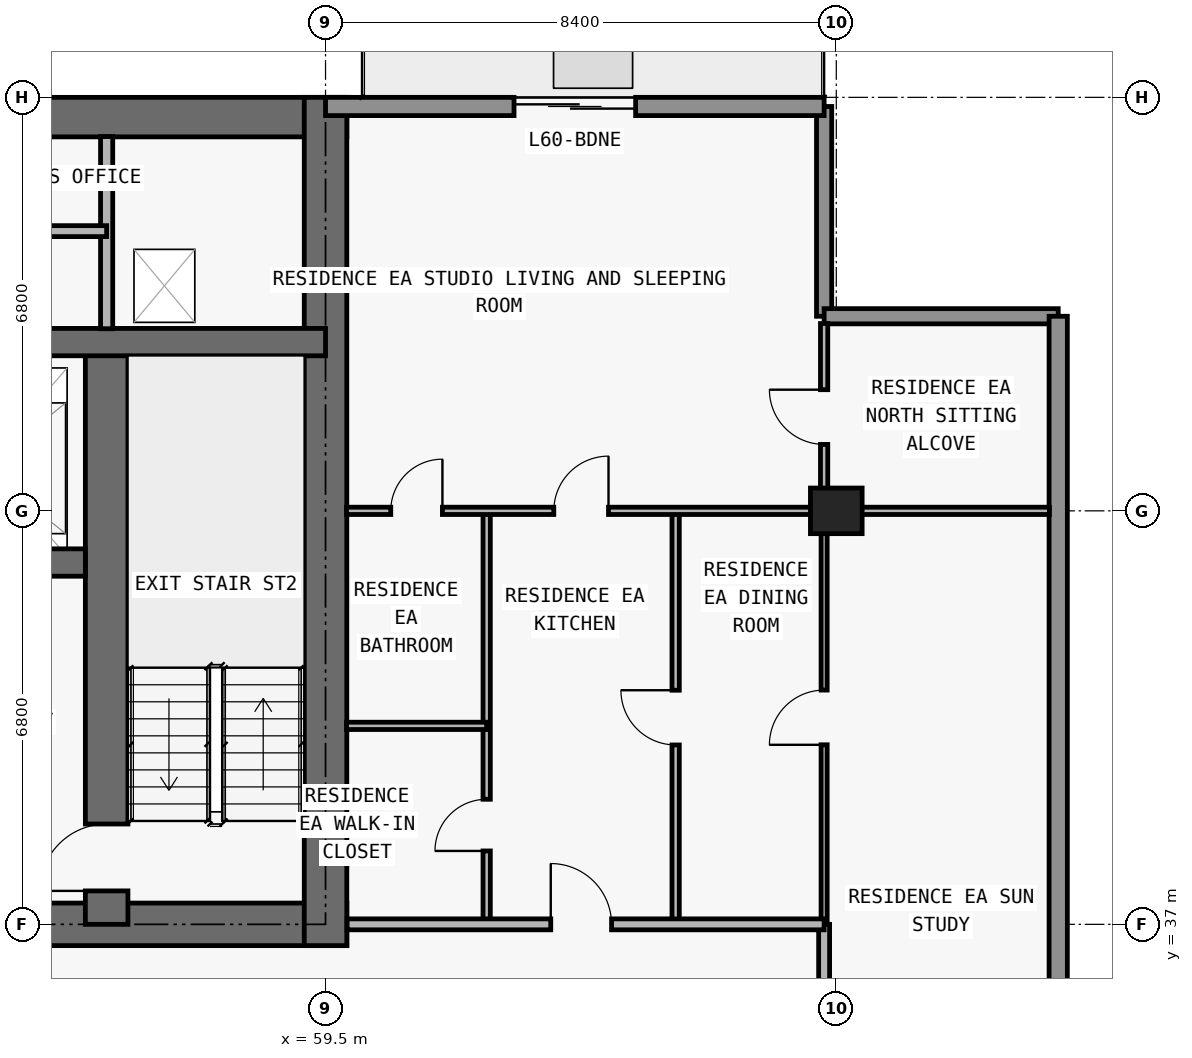
"""IFC4 building model, lengths in metres.
Left out: names, types, materials, properties, quantities, classifications, styles, units other than length and angle.
Written with IfcOpenShell. Run it as: python <this file> out.ifc"""

import sys

from ifc_helpers import new_model, si_unit, direction, frame, frame_2d, origin, origin_2d, place, context, subcontext, project, spatial, rectangle, extrude, element, fill, save


model = new_model("IFC4")
c1 = context("Model", 3, precision=1e-05, world=origin(), true_north=direction((0.0, 1.0)))
c2 = subcontext(c1, "Body", "Model", "MODEL_VIEW")
j1 = project(units=[si_unit("LENGTHUNIT", "METRE"), si_unit("PLANEANGLEUNIT", "RADIAN")], contexts=[c1])
p1 = place(None, origin())
s1 = spatial("IfcSite", under=j1, at=p1, CompositionType="ELEMENT")
p2 = place(p1, origin())
s2 = spatial("IfcBuilding", under=s1, at=p2, CompositionType="ELEMENT")
p3 = place(p2, frame((0.0, 0.0, 214.8)))
s3 = spatial("IfcBuildingStorey", under=s2, at=p3, CompositionType="ELEMENT", Elevation=214.8)
p4 = place(p3, frame((67.9, 43.8, 0.0), z_axis=(0.0, 0.0, 1.0), x_axis=(1.0, 0.0, 0.0)))
e1 = element("IfcColumn", 1, at=p4, inside=s3, PredefinedType="COLUMN", context=c2, shape_type="SweptSolid", body=[
    extrude(rectangle(XDim=0.85, YDim=0.75, at=origin_2d()), origin(), (0.0, 0.0, 1.0), 3.05),
])
p5 = place(p3, frame((17.95, 37.0, 0.0), z_axis=(0.0, 0.0, 1.0), x_axis=(1.0, 0.0, 0.0)))
e2 = element("IfcWall", 2, at=p5, inside=s3, PredefinedType="SHEAR", context=c2, shape_type="SweptSolid", body=[
    extrude(rectangle(XDim=41.9, YDim=0.7, at=frame_2d((20.95, 0.0))), origin(), (0.0, 0.0, 1.0), 3.05),
])
p6 = place(p5, frame((14.35, 0.0, 0.0)))
e3 = element("IfcOpeningElement", 3, at=p6, cuts=e2, PredefinedType="OPENING", context=c2, shape_type="SweptSolid", body=[
    extrude(rectangle(XDim=1.1, YDim=2.15, at=frame_2d((0.55, 1.075))), frame((0.0, 0.36, 0.0), z_axis=(0.0, -1.0, 0.0), x_axis=(1.0, 0.0, 0.0)), (0.0, 0.0, 1.0), 0.72),
])
p7 = place(p5, frame((6.2, 0.0, 0.0)))
e4 = element("IfcOpeningElement", 4, at=p7, cuts=e2, PredefinedType="OPENING", context=c2, shape_type="SweptSolid", body=[
    extrude(rectangle(XDim=1.05, YDim=2.15, at=frame_2d((0.525, 1.075))), frame((0.0, 0.36, 0.0), z_axis=(0.0, -1.0, 0.0), x_axis=(1.0, 0.0, 0.0)), (0.0, 0.0, 1.0), 0.72),
])
p8 = place(p5, frame((34.7, 0.0, 0.0)))
e5 = element("IfcOpeningElement", 5, at=p8, cuts=e2, PredefinedType="OPENING", context=c2, shape_type="SweptSolid", body=[
    extrude(rectangle(XDim=1.05, YDim=2.15, at=frame_2d((0.525, 1.075))), frame((0.0, 0.36, 0.0), z_axis=(0.0, -1.0, 0.0), x_axis=(1.0, 0.0, 0.0)), (0.0, 0.0, 1.0), 0.72),
])
p9 = place(p5, frame((10.812, 0.0, 0.0)))
e6 = element("IfcOpeningElement", 6, at=p9, cuts=e2, PredefinedType="OPENING", context=c2, shape_type="SweptSolid", body=[
    extrude(rectangle(XDim=1.05, YDim=2.15, at=frame_2d((0.525, 1.075))), frame((0.0, 0.36, 0.0), z_axis=(0.0, -1.0, 0.0), x_axis=(1.0, 0.0, 0.0)), (0.0, 0.0, 1.0), 0.72),
])
p10 = place(p5, frame((24.05, 0.0, 0.0)))
e7 = element("IfcOpeningElement", 7, at=p10, cuts=e2, PredefinedType="OPENING", context=c2, shape_type="SweptSolid", body=[
    extrude(rectangle(XDim=1.05, YDim=2.15, at=frame_2d((0.525, 1.075))), frame((0.0, 0.36, 0.0), z_axis=(0.0, -1.0, 0.0), x_axis=(1.0, 0.0, 0.0)), (0.0, 0.0, 1.0), 0.72),
])
p11 = place(p3, frame((17.95, 50.275, 0.0), z_axis=(0.0, 0.0, 1.0), x_axis=(1.0, 0.0, 0.0)))
e8 = element("IfcWall", 8, at=p11, inside=s3, PredefinedType="SHEAR", context=c2, shape_type="SweptSolid", body=[
    extrude(rectangle(XDim=41.9, YDim=0.65, at=frame_2d((20.95, 0.0))), origin(), (0.0, 0.0, 1.0), 3.05),
])
p12 = place(p3, frame((59.5, 36.65, 0.0), z_axis=(0.0, 0.0, 1.0), x_axis=(0.0, 1.0, 0.0)))
e9 = element("IfcWall", 9, at=p12, inside=s3, PredefinedType="SHEAR", context=c2, shape_type="SweptSolid", body=[
    extrude(rectangle(XDim=13.95, YDim=0.7, at=frame_2d((6.975, 0.0))), origin(), (0.0, 0.0, 1.0), 3.05),
])
p13 = place(p3, frame((55.9, 37.0, 0.0), z_axis=(0.0, 0.0, 1.0), x_axis=(0.0, 1.0, 0.0)))
e10 = element("IfcWall", 10, at=p13, inside=s3, PredefinedType="SHEAR", context=c2, shape_type="SweptSolid", body=[
    extrude(rectangle(XDim=9.575, YDim=0.7, at=frame_2d((4.788, 0.0))), origin(), (0.0, 0.0, 1.0), 3.05),
])
p14 = place(p13, frame((0.55, 0.0, 0.0)))
e11 = element("IfcOpeningElement", 11, at=p14, cuts=e10, PredefinedType="OPENING", context=c2, shape_type="SweptSolid", body=[
    extrude(rectangle(XDim=1.1, YDim=2.15, at=frame_2d((0.55, 1.075))), frame((0.0, 0.36, 0.0), z_axis=(0.0, -1.0, 0.0), x_axis=(1.0, 0.0, 0.0)), (0.0, 0.0, 1.0), 0.72),
])
p15 = place(p3, frame((22.25, 42.95, 0.0), z_axis=(0.0, 0.0, 1.0), x_axis=(1.0, 0.0, 0.0)))
e12 = element("IfcWall", 12, at=p15, inside=s3, PredefinedType="SHEAR", context=c2, shape_type="SweptSolid", body=[
    extrude(rectangle(XDim=33.3, YDim=0.45, at=frame_2d((16.65, 0.0))), origin(), (0.0, 0.0, 1.0), 3.05),
])
p16 = place(p15, frame((1.05, 0.0, 0.0)))
e13 = element("IfcOpeningElement", 13, at=p16, cuts=e12, PredefinedType="OPENING", context=c2, shape_type="SweptSolid", body=[
    extrude(rectangle(XDim=1.2, YDim=2.2, at=frame_2d((0.6, 1.1))), frame((0.0, 0.235, 0.0), z_axis=(0.0, -1.0, 0.0), x_axis=(1.0, 0.0, 0.0)), (0.0, 0.0, 1.0), 0.47),
])
p17 = place(p15, frame((31.05, 0.0, 0.0)))
e14 = element("IfcOpeningElement", 14, at=p17, cuts=e12, PredefinedType="OPENING", context=c2, shape_type="SweptSolid", body=[
    extrude(rectangle(XDim=1.2, YDim=2.2, at=frame_2d((0.6, 1.1))), frame((0.0, 0.235, 0.0), z_axis=(0.0, -1.0, 0.0), x_axis=(1.0, 0.0, 0.0)), (0.0, 0.0, 1.0), 0.47),
])
p18 = place(p15, frame((26.45, 0.0, 0.0)))
e15 = element("IfcOpeningElement", 15, at=p18, cuts=e12, PredefinedType="OPENING", context=c2, shape_type="SweptSolid", body=[
    extrude(rectangle(XDim=1.1, YDim=2.2, at=frame_2d((0.55, 1.1))), frame((0.0, 0.235, 0.0), z_axis=(0.0, -1.0, 0.0), x_axis=(1.0, 0.0, 0.0)), (0.0, 0.0, 1.0), 0.47),
])
p19 = place(p15, frame((5.95, 0.0, 0.0)))
e16 = element("IfcOpeningElement", 16, at=p19, cuts=e12, PredefinedType="OPENING", context=c2, shape_type="SweptSolid", body=[
    extrude(rectangle(XDim=1.1, YDim=2.2, at=frame_2d((0.55, 1.1))), frame((0.0, 0.235, 0.0), z_axis=(0.0, -1.0, 0.0), x_axis=(1.0, 0.0, 0.0)), (0.0, 0.0, 1.0), 0.47),
])
p20 = place(p15, frame((3.625, 0.0, 0.0)))
e17 = element("IfcOpeningElement", 17, at=p20, cuts=e12, PredefinedType="OPENING", context=c2, shape_type="SweptSolid", body=[
    extrude(rectangle(XDim=1.05, YDim=2.15, at=frame_2d((0.525, 1.075))), frame((0.0, 0.235, 0.0), z_axis=(0.0, -1.0, 0.0), x_axis=(1.0, 0.0, 0.0)), (0.0, 0.0, 1.0), 0.47),
])
p21 = place(p15, frame((28.675, 0.0, 0.0)))
e18 = element("IfcOpeningElement", 18, at=p21, cuts=e12, PredefinedType="OPENING", context=c2, shape_type="SweptSolid", body=[
    extrude(rectangle(XDim=1.05, YDim=2.15, at=frame_2d((0.525, 1.075))), frame((0.0, 0.235, 0.0), z_axis=(0.0, -1.0, 0.0), x_axis=(1.0, 0.0, 0.0)), (0.0, 0.0, 1.0), 0.47),
])
p22 = place(p15, frame((15.225, 0.0, 0.0)))
e19 = element("IfcOpeningElement", 19, at=p22, cuts=e12, PredefinedType="OPENING", context=c2, shape_type="SweptSolid", body=[
    extrude(rectangle(XDim=1.0, YDim=2.2, at=frame_2d((0.5, 1.1))), frame((0.0, 0.235, 0.0), z_axis=(0.0, -1.0, 0.0), x_axis=(1.0, 0.0, 0.0)), (0.0, 0.0, 1.0), 0.47),
])
p23 = place(p15, frame((21.975, 0.0, 0.0)))
e20 = element("IfcOpeningElement", 20, at=p23, cuts=e12, PredefinedType="OPENING", context=c2, shape_type="SweptSolid", body=[
    extrude(rectangle(XDim=1.0, YDim=2.2, at=frame_2d((0.5, 1.1))), frame((0.0, 0.235, 0.0), z_axis=(0.0, -1.0, 0.0), x_axis=(1.0, 0.0, 0.0)), (0.0, 0.0, 1.0), 0.47),
])
p24 = place(p3, frame((18.3, 46.575, 0.0), z_axis=(0.0, 0.0, 1.0), x_axis=(1.0, 0.0, 0.0)))
e21 = element("IfcWall", 21, at=p24, inside=s3, PredefinedType="SHEAR", context=c2, shape_type="SweptSolid", body=[
    extrude(rectangle(XDim=41.2, YDim=0.45, at=frame_2d((20.6, 0.0))), origin(), (0.0, 0.0, 1.0), 3.05),
])
p25 = place(p24, frame((7.575, 0.0, 0.0)))
e22 = element("IfcOpeningElement", 22, at=p25, cuts=e21, PredefinedType="OPENING", context=c2, shape_type="SweptSolid", body=[
    extrude(rectangle(XDim=1.05, YDim=2.15, at=frame_2d((0.525, 1.075))), frame((0.0, 0.235, 0.0), z_axis=(0.0, -1.0, 0.0), x_axis=(1.0, 0.0, 0.0)), (0.0, 0.0, 1.0), 0.47),
])
p26 = place(p24, frame((32.625, 0.0, 0.0)))
e23 = element("IfcOpeningElement", 23, at=p26, cuts=e21, PredefinedType="OPENING", context=c2, shape_type="SweptSolid", body=[
    extrude(rectangle(XDim=1.05, YDim=2.15, at=frame_2d((0.525, 1.075))), frame((0.0, 0.235, 0.0), z_axis=(0.0, -1.0, 0.0), x_axis=(1.0, 0.0, 0.0)), (0.0, 0.0, 1.0), 0.47),
])
p27 = place(p3, frame((67.7, 50.45, 0.0), z_axis=(0.0, 0.0, 1.0), x_axis=(0.0, -1.0, 0.0)))
e24 = element("IfcWall", 24, at=p27, inside=s3, PredefinedType="ELEMENTEDWALL", context=c2, shape_type="SweptSolid", body=[
    extrude(rectangle(XDim=3.45, YDim=0.25, at=frame_2d((1.725, 0.0))), origin(), (0.0, 0.0, 1.0), 3.05),
])
p28 = place(p3, frame((67.7, 47.0, 0.0), z_axis=(0.0, 0.0, 1.0), x_axis=(1.0, 0.0, 0.0)))
e25 = element("IfcWall", 25, at=p28, inside=s3, PredefinedType="ELEMENTEDWALL", context=c2, shape_type="SweptSolid", body=[
    extrude(rectangle(XDim=3.85, YDim=0.25, at=frame_2d((1.925, 0.0))), origin(), (0.0, 0.0, 1.0), 3.05),
])
p29 = place(p3, frame((71.55, 47.0, 0.0), z_axis=(0.0, 0.0, 1.0), x_axis=(0.0, -1.0, 0.0)))
e26 = element("IfcWall", 26, at=p29, inside=s3, PredefinedType="STANDARD", context=c2, shape_type="SweptSolid", body=[
    extrude(rectangle(XDim=17.9, YDim=0.3, at=frame_2d((8.95, 0.0))), origin(), (0.0, 0.0, 1.0), 3.05),
])
p30 = place(p3, frame((59.5, 50.45, 0.0), z_axis=(0.0, 0.0, 1.0), x_axis=(1.0, 0.0, 0.0)))
e27 = element("IfcWall", 27, at=p30, inside=s3, PredefinedType="STANDARD", context=c2, shape_type="SweptSolid", body=[
    extrude(rectangle(XDim=8.2, YDim=0.3, at=frame_2d((4.1, 0.0))), origin(), (0.0, 0.0, 1.0), 3.05),
])
p31 = place(p30, frame((3.1, 0.0, 0.0)))
e28 = element("IfcOpeningElement", 28, at=p31, cuts=e27, PredefinedType="OPENING", context=c2, shape_type="SweptSolid", body=[
    extrude(rectangle(XDim=2.0, YDim=2.3, at=frame_2d((1.0, 1.15))), frame((0.0, 0.16, 0.0), z_axis=(0.0, -1.0, 0.0), x_axis=(1.0, 0.0, 0.0)), (0.0, 0.0, 1.0), 0.32),
])
p32 = place(p3, frame((55.9, 46.795, 0.0), z_axis=(0.0, 0.0, 1.0), x_axis=(0.0, 1.0, 0.0)))
e29 = element("IfcWall", 29, at=p32, inside=s3, PredefinedType="PARTITIONING", context=c2, shape_type="SweptSolid", body=[
    extrude(rectangle(XDim=3.16, YDim=0.2, at=frame_2d((1.58, 0.0))), origin(), (0.0, 0.0, 1.0), 3.05),
])
p33 = place(p3, frame((62.15, 37.0, 0.0), z_axis=(0.0, 0.0, 1.0), x_axis=(0.0, 1.0, 0.0)))
e30 = element("IfcWall", 30, at=p33, inside=s3, PredefinedType="PARTITIONING", context=c2, shape_type="SweptSolid", body=[
    extrude(rectangle(XDim=6.8, YDim=0.12, at=frame_2d((3.4, 0.0))), origin(), (0.0, 0.0, 1.0), 2.578),
])
p34 = place(p33, frame((1.207, 0.0, 0.0)))
e31 = element("IfcOpeningElement", 31, at=p34, cuts=e30, PredefinedType="OPENING", context=c2, shape_type="SweptSolid", body=[
    extrude(rectangle(XDim=0.85, YDim=2.1, at=frame_2d((0.425, 1.05))), frame((0.0, 0.07, 0.0), z_axis=(0.0, -1.0, 0.0), x_axis=(1.0, 0.0, 0.0)), (0.0, 0.0, 1.0), 0.14),
])
p35 = place(p3, frame((65.258, 37.0, 0.0), z_axis=(0.0, 0.0, 1.0), x_axis=(0.0, 1.0, 0.0)))
e32 = element("IfcWall", 32, at=p35, inside=s3, PredefinedType="PARTITIONING", context=c2, shape_type="SweptSolid", body=[
    extrude(rectangle(XDim=6.8, YDim=0.12, at=frame_2d((3.4, 0.0))), origin(), (0.0, 0.0, 1.0), 2.679),
])
p36 = place(p35, frame((2.95, 0.0, 0.0)))
e33 = element("IfcOpeningElement", 33, at=p36, cuts=e32, PredefinedType="OPENING", context=c2, shape_type="SweptSolid", body=[
    extrude(rectangle(XDim=0.9, YDim=2.15, at=frame_2d((0.45, 1.075))), frame((0.0, 0.07, 0.0), z_axis=(0.0, -1.0, 0.0), x_axis=(1.0, 0.0, 0.0)), (0.0, 0.0, 1.0), 0.14),
])
p37 = place(p3, frame((67.7, 34.405, 0.0), z_axis=(0.0, 0.0, 1.0), x_axis=(0.0, 1.0, 0.0)))
e34 = element("IfcWall", 34, at=p37, inside=s3, PredefinedType="PARTITIONING", context=c2, shape_type="SweptSolid", body=[
    extrude(rectangle(XDim=2.595, YDim=0.18, at=frame_2d((1.297, 0.0))), origin(), (0.0, 0.0, 1.0), 2.263),
])
p38 = place(p3, frame((67.7, 37.005, 0.0), z_axis=(0.0, 0.0, 1.0), x_axis=(0.0, 1.0, 0.0)))
e35 = element("IfcWall", 35, at=p38, inside=s3, PredefinedType="MOVABLE", context=c2, shape_type="SweptSolid", body=[
    extrude(rectangle(XDim=6.795, YDim=0.1, at=frame_2d((3.397, 0.0))), origin(), (0.0, 0.0, 1.0), 2.263),
])
p39 = place(p38, frame((2.948, 0.0, 0.0)))
e36 = element("IfcOpeningElement", 36, at=p39, cuts=e35, PredefinedType="OPENING", context=c2, shape_type="SweptSolid", body=[
    extrude(rectangle(XDim=0.9, YDim=2.15, at=frame_2d((0.45, 1.075))), frame((0.0, 0.06, 0.0), z_axis=(0.0, -1.0, 0.0), x_axis=(1.0, 0.0, 0.0)), (0.0, 0.0, 1.0), 0.12),
])
p40 = place(p3, frame((67.7, 43.805, 0.0), z_axis=(0.0, 0.0, 1.0), x_axis=(0.0, 1.0, 0.0)))
e37 = element("IfcWall", 37, at=p40, inside=s3, PredefinedType="PARTITIONING", context=c2, shape_type="SweptSolid", body=[
    extrude(rectangle(XDim=3.075, YDim=0.12, at=frame_2d((1.538, 0.0))), origin(), (0.0, 0.0, 1.0), 3.05),
])
p41 = place(p40, frame((1.087, 0.0, 0.0)))
e38 = element("IfcOpeningElement", 38, at=p41, cuts=e37, PredefinedType="OPENING", context=c2, shape_type="SweptSolid", body=[
    extrude(rectangle(XDim=0.9, YDim=2.15, at=frame_2d((0.45, 1.075))), frame((0.0, 0.07, 0.0), z_axis=(0.0, -1.0, 0.0), x_axis=(1.0, 0.0, 0.0)), (0.0, 0.0, 1.0), 0.14),
])
p42 = place(p3, frame((59.855, 37.0, 0.0), z_axis=(0.0, 0.0, 1.0), x_axis=(1.0, 0.0, 0.0)))
e39 = element("IfcWall", 39, at=p42, inside=s3, PredefinedType="PARTITIONING", context=c2, shape_type="SweptSolid", body=[
    extrude(rectangle(XDim=7.845, YDim=0.18, at=frame_2d((3.922, 0.0))), origin(), (0.0, 0.0, 1.0), 3.05),
])
p43 = place(p42, frame((3.349, 0.0, 0.0)))
e40 = element("IfcOpeningElement", 40, at=p43, cuts=e39, PredefinedType="OPENING", context=c2, shape_type="SweptSolid", body=[
    extrude(rectangle(XDim=1.0, YDim=2.2, at=frame_2d((0.5, 1.1))), frame((0.0, 0.1, 0.0), z_axis=(0.0, -1.0, 0.0), x_axis=(1.0, 0.0, 0.0)), (0.0, 0.0, 1.0), 0.2),
])
p44 = place(p3, frame((59.845, 40.264, 0.0), z_axis=(0.0, 0.0, 1.0), x_axis=(1.0, 0.0, 0.0)))
e41 = element("IfcWall", 41, at=p44, inside=s3, PredefinedType="PARTITIONING", context=c2, shape_type="SweptSolid", body=[
    extrude(rectangle(XDim=2.305, YDim=0.12, at=frame_2d((1.152, 0.0))), origin(), (0.0, 0.0, 1.0), 3.05),
])
p45 = place(p3, frame((59.845, 43.8, 0.0), z_axis=(0.0, 0.0, 1.0), x_axis=(1.0, 0.0, 0.0)))
e42 = element("IfcWall", 42, at=p45, inside=s3, PredefinedType="PARTITIONING", context=c2, shape_type="SweptSolid", body=[
    extrude(rectangle(XDim=11.56, YDim=0.12, at=frame_2d((5.78, 0.0))), origin(), (0.0, 0.0, 1.0), 2.418),
])
p46 = place(p45, frame((3.409, 0.0, 0.0)))
e43 = element("IfcOpeningElement", 43, at=p46, cuts=e42, PredefinedType="OPENING", context=c2, shape_type="SweptSolid", body=[
    extrude(rectangle(XDim=0.9, YDim=2.15, at=frame_2d((0.45, 1.075))), frame((0.0, 0.07, 0.0), z_axis=(0.0, -1.0, 0.0), x_axis=(1.0, 0.0, 0.0)), (0.0, 0.0, 1.0), 0.14),
])
p47 = place(p45, frame((0.728, 0.0, 0.0)))
e44 = element("IfcOpeningElement", 44, at=p47, cuts=e42, PredefinedType="OPENING", context=c2, shape_type="SweptSolid", body=[
    extrude(rectangle(XDim=0.85, YDim=2.1, at=frame_2d((0.425, 1.05))), frame((0.0, 0.07, 0.0), z_axis=(0.0, -1.0, 0.0), x_axis=(1.0, 0.0, 0.0)), (0.0, 0.0, 1.0), 0.14),
])
p48 = place(p3, frame((39.28, 48.4, 0.0), z_axis=(0.0, 0.0, 1.0), x_axis=(1.0, 0.0, 0.0)))
e45 = element("IfcWall", 45, at=p48, inside=s3, PredefinedType="PARTITIONING", context=c2, shape_type="SweptSolid", body=[
    extrude(rectangle(XDim=16.62, YDim=0.18, at=frame_2d((8.31, 0.0))), origin(), (0.0, 0.0, 1.0), 3.05),
])
p49 = place(p48, frame((7.81, 0.0, 0.0)))
e46 = element("IfcOpeningElement", 46, at=p49, cuts=e45, PredefinedType="OPENING", context=c2, shape_type="SweptSolid", body=[
    extrude(rectangle(XDim=1.0, YDim=2.2, at=frame_2d((0.5, 1.1))), frame((0.0, 0.1, 0.0), z_axis=(0.0, -1.0, 0.0), x_axis=(1.0, 0.0, 0.0)), (0.0, 0.0, 1.0), 0.2),
])
p50 = place(p31, origin())
e47 = element("IfcDoor", 47, at=p50, inside=s3, OperationType="DOUBLE_DOOR_SLIDING", PredefinedType="DOOR", context=c2, shape_type="SweptSolid", body=[
    extrude(rectangle(XDim=2.0, YDim=2.3, at=frame_2d((1.0, 1.15))), frame((0.0, 0.025, 0.0), z_axis=(0.0, -1.0, 0.0), x_axis=(1.0, 0.0, 0.0)), (0.0, 0.0, 1.0), 0.05),
])
fill(e28, e47)
p51 = place(p14, origin())
e48 = element("IfcDoor", 48, at=p51, inside=s3, OperationType="SINGLE_SWING_LEFT", PredefinedType="DOOR", context=c2, shape_type="SweptSolid", body=[
    extrude(rectangle(XDim=1.1, YDim=2.15, at=frame_2d((0.55, 1.075))), frame((0.0, 0.025, 0.0), z_axis=(0.0, -1.0, 0.0), x_axis=(1.0, 0.0, 0.0)), (0.0, 0.0, 1.0), 0.05),
])
fill(e11, e48)
p52 = place(p36, origin())
e49 = element("IfcDoor", 49, at=p52, inside=s3, OperationType="SINGLE_SWING_RIGHT", PredefinedType="DOOR", context=c2, shape_type="SweptSolid", body=[
    extrude(rectangle(XDim=0.9, YDim=2.15, at=frame_2d((0.45, 1.075))), frame((0.0, 0.025, 0.0), z_axis=(0.0, -1.0, 0.0), x_axis=(1.0, 0.0, 0.0)), (0.0, 0.0, 1.0), 0.05),
])
fill(e33, e49)
p53 = place(p43, origin())
e50 = element("IfcDoor", 50, at=p53, inside=s3, OperationType="SINGLE_SWING_LEFT", PredefinedType="DOOR", context=c2, shape_type="SweptSolid", body=[
    extrude(rectangle(XDim=1.0, YDim=2.2, at=frame_2d((0.5, 1.1))), frame((0.0, 0.025, 0.0), z_axis=(0.0, -1.0, 0.0), x_axis=(1.0, 0.0, 0.0)), (0.0, 0.0, 1.0), 0.05),
])
fill(e40, e50)
p54 = place(p46, origin())
e51 = element("IfcDoor", 51, at=p54, inside=s3, OperationType="SINGLE_SWING_RIGHT", PredefinedType="DOOR", context=c2, shape_type="SweptSolid", body=[
    extrude(rectangle(XDim=0.9, YDim=2.15, at=frame_2d((0.45, 1.075))), frame((0.0, 0.025, 0.0), z_axis=(0.0, -1.0, 0.0), x_axis=(1.0, 0.0, 0.0)), (0.0, 0.0, 1.0), 0.05),
])
fill(e43, e51)
p55 = place(p34, origin())
e52 = element("IfcDoor", 52, at=p55, inside=s3, OperationType="SINGLE_SWING_LEFT", PredefinedType="DOOR", context=c2, shape_type="SweptSolid", body=[
    extrude(rectangle(XDim=0.85, YDim=2.1, at=frame_2d((0.425, 1.05))), frame((0.0, 0.025, 0.0), z_axis=(0.0, -1.0, 0.0), x_axis=(1.0, 0.0, 0.0)), (0.0, 0.0, 1.0), 0.05),
])
fill(e31, e52)
p56 = place(p47, origin())
e53 = element("IfcDoor", 53, at=p56, inside=s3, OperationType="SINGLE_SWING_RIGHT", PredefinedType="DOOR", context=c2, shape_type="SweptSolid", body=[
    extrude(rectangle(XDim=0.85, YDim=2.1, at=frame_2d((0.425, 1.05))), frame((0.0, 0.025, 0.0), z_axis=(0.0, -1.0, 0.0), x_axis=(1.0, 0.0, 0.0)), (0.0, 0.0, 1.0), 0.05),
])
fill(e44, e53)
p57 = place(p39, origin())
e54 = element("IfcDoor", 54, at=p57, inside=s3, OperationType="SINGLE_SWING_LEFT", PredefinedType="DOOR", context=c2, shape_type="SweptSolid", body=[
    extrude(rectangle(XDim=0.9, YDim=2.15, at=frame_2d((0.45, 1.075))), frame((0.0, 0.025, 0.0), z_axis=(0.0, -1.0, 0.0), x_axis=(1.0, 0.0, 0.0)), (0.0, 0.0, 1.0), 0.05),
])
fill(e36, e54)
p58 = place(p41, origin())
e55 = element("IfcDoor", 55, at=p58, inside=s3, OperationType="SINGLE_SWING_RIGHT", PredefinedType="DOOR", context=c2, shape_type="SweptSolid", body=[
    extrude(rectangle(XDim=0.9, YDim=2.15, at=frame_2d((0.45, 1.075))), frame((0.0, 0.025, 0.0), z_axis=(0.0, -1.0, 0.0), x_axis=(1.0, 0.0, 0.0)), (0.0, 0.0, 1.0), 0.05),
])
fill(e38, e55)
save(model, sys.argv[1])
